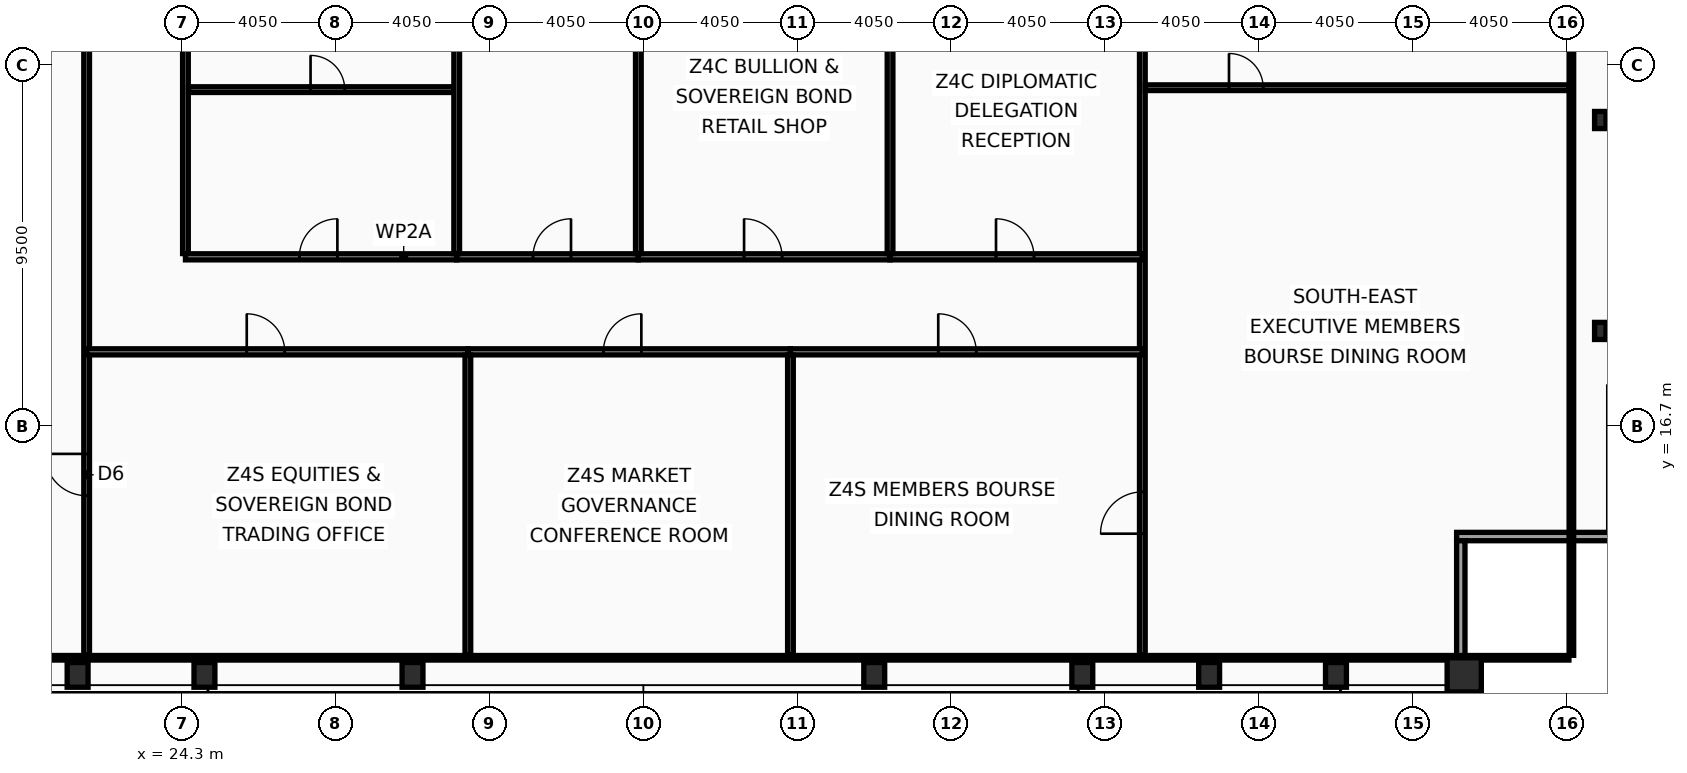
"""IFC4 building model, lengths in metres.
Left out: names, types, materials, properties, quantities, classifications, styles, units other than length and angle.
Written with IfcOpenShell. Run it as: python <this file> out.ifc"""

import sys

from ifc_helpers import new_model, si_unit, direction, frame, frame_2d, origin, origin_2d, place, context, subcontext, project, spatial, rectangle, hollow_rectangle, i_section, extrude, element, fill, save


model = new_model("IFC4")
c1 = context("Model", 3, precision=1e-05, world=origin(), true_north=direction((0.0, 1.0)))
c2 = subcontext(c1, "Body", "Model", "MODEL_VIEW")
j1 = project(units=[si_unit("LENGTHUNIT", "METRE"), si_unit("PLANEANGLEUNIT", "RADIAN")], contexts=[c1])
p1 = place(None, origin())
s1 = spatial("IfcSite", under=j1, at=p1, CompositionType="ELEMENT")
p2 = place(p1, origin())
s2 = spatial("IfcBuilding", under=s1, at=p2, CompositionType="ELEMENT")
p3 = place(p2, frame((0.0, 0.0, 298.6)))
s3 = spatial("IfcBuildingStorey", under=s2, at=p3, CompositionType="ELEMENT", Elevation=298.6)
p4 = place(p3, frame((58.05, 10.15, 0.0), z_axis=(0.0, 0.0, 1.0), x_axis=(1.0, 0.0, 0.0)))
e1 = element("IfcColumn", 1, at=p4, inside=s3, PredefinedType="COLUMN", context=c2, shape_type="SweptSolid", body=[
    extrude(hollow_rectangle(XDim=0.9, YDim=0.9, WallThickness=0.05, at=origin_2d()), origin(), (0.0, 0.0, 1.0), 3.6),
])
for number, where, z_axis, x_axis in (
    (2, (21.562, 10.15, 0.0), (0.0, 0.0, 1.0), (1.0, 0.0, 0.0)),
    (3, (24.9, 10.15, 0.0), (0.0, 0.0, 1.0), (1.0, 0.0, 0.0)),
    (4, (30.375, 10.15, 0.0), (0.0, 0.0, 1.0), (1.0, 0.0, 0.0)),
    (5, (42.525, 10.15, 0.0), (0.0, 0.0, 1.0), (1.0, 0.0, 0.0)),
    (6, (48.0, 10.15, 0.0), (0.0, 0.0, 1.0), (1.0, 0.0, 0.0)),
    (7, (51.337, 10.15, 0.0), (0.0, 0.0, 1.0), (1.0, 0.0, 0.0)),
    (8, (54.675, 10.15, 0.0), (0.0, 0.0, 1.0), (1.0, 0.0, 0.0)),
):
    element("IfcColumn", number, at=place(p3, frame(where, z_axis=z_axis, x_axis=x_axis)), inside=s3, PredefinedType="COLUMN", context=c2, shape_type="SweptSolid", body=[
        extrude(hollow_rectangle(XDim=0.55, YDim=0.65, WallThickness=0.04, at=origin_2d()), origin(), (0.0, 0.0, 1.0), 3.6),
    ])
for number, where, z_axis, x_axis in (
    (9, (61.63, 19.2, 0.0), (0.0, 0.0, 1.0), (1.0, 0.0, 0.0)),
    (10, (61.63, 24.75, 0.0), (0.0, 0.0, 1.0), (1.0, 0.0, 0.0)),
):
    element("IfcColumn", number, at=place(p3, frame(where, z_axis=z_axis, x_axis=x_axis)), inside=s3, PredefinedType="COLUMN", context=c2, shape_type="SweptSolid", body=[
        extrude(i_section(OverallWidth=0.3, OverallDepth=0.45, WebThickness=0.014, FlangeThickness=0.026, at=origin_2d()), origin(), (0.0, 0.0, 1.0), 3.6),
    ])
p5 = place(p3, frame((62.07, 13.79, 0.0), z_axis=(0.0, 0.0, 1.0), x_axis=(-1.0, 0.0, 0.0)))
e11 = element("IfcWall", 11, at=p5, inside=s3, PredefinedType="SOLIDWALL", context=c2, shape_type="SweptSolid", body=[
    extrude(rectangle(XDim=4.22, YDim=0.22, at=frame_2d((2.11, 0.0))), origin(), (0.0, 0.0, 1.0), 2.88),
])
p6 = place(p3, frame((57.96, 13.68, 0.0), z_axis=(0.0, 0.0, 1.0), x_axis=(0.0, -1.0, 0.0)))
e12 = element("IfcWall", 12, at=p6, inside=s3, PredefinedType="SOLIDWALL", context=c2, shape_type="SweptSolid", body=[
    extrude(rectangle(XDim=3.91, YDim=0.22, at=frame_2d((1.955, 0.0))), origin(), (0.0, 0.0, 1.0), 2.88),
])
p7 = place(p3, frame((21.8, 10.665, 0.0), z_axis=(0.0, 0.0, 1.0), x_axis=(0.0, 1.0, 0.0)))
e13 = element("IfcWall", 13, at=p7, inside=s3, PredefinedType="PARTITIONING", context=c2, shape_type="SweptSolid", body=[
    extrude(rectangle(XDim=24.955, YDim=0.15, at=frame_2d((12.478, 0.0))), origin(), (0.0, 0.0, 1.0), 3.03),
])
p8 = place(p7, frame((4.2, 0.0, 0.0)))
e14 = element("IfcOpeningElement", 14, at=p8, cuts=e13, PredefinedType="OPENING", context=c2, shape_type="SweptSolid", body=[
    extrude(rectangle(XDim=1.1, YDim=2.1, at=frame_2d((0.55, 1.05))), frame((0.0, 0.085, 0.0), z_axis=(0.0, -1.0, 0.0), x_axis=(1.0, 0.0, 0.0)), (0.0, 0.0, 1.0), 0.17),
])
p9 = place(p3, frame((24.4, 21.235, 0.0), z_axis=(0.0, 0.0, 1.0), x_axis=(0.0, 1.0, 0.0)))
e15 = element("IfcWall", 15, at=p9, inside=s3, PredefinedType="PARTITIONING", context=c2, shape_type="SweptSolid", body=[
    extrude(rectangle(XDim=14.385, YDim=0.15, at=frame_2d((7.192, 0.0))), origin(), (0.0, 0.0, 1.0), 2.78),
])
p10 = place(p3, frame((49.58, 10.665, 0.0), z_axis=(0.0, 0.0, 1.0), x_axis=(0.0, 1.0, 0.0)))
e16 = element("IfcWall", 16, at=p10, inside=s3, PredefinedType="PARTITIONING", context=c2, shape_type="SweptSolid", body=[
    extrude(rectangle(XDim=24.955, YDim=0.15, at=frame_2d((12.478, 0.0))), origin(), (0.0, 0.0, 1.0), 3.03),
])
p11 = place(p10, frame((3.2, 0.0, 0.0)))
e17 = element("IfcOpeningElement", 17, at=p11, cuts=e16, PredefinedType="OPENING", context=c2, shape_type="SweptSolid", body=[
    extrude(rectangle(XDim=1.1, YDim=2.1, at=frame_2d((0.55, 1.05))), frame((0.0, 0.085, 0.0), z_axis=(0.0, -1.0, 0.0), x_axis=(1.0, 0.0, 0.0)), (0.0, 0.0, 1.0), 0.17),
])
p12 = place(p3, frame((49.66, 25.6, 0.0), z_axis=(0.0, 0.0, 1.0), x_axis=(1.0, 0.0, 0.0)))
e18 = element("IfcWall", 18, at=p12, inside=s3, PredefinedType="PARTITIONING", context=c2, shape_type="SweptSolid", body=[
    extrude(rectangle(XDim=11.145, YDim=0.15, at=frame_2d((5.573, 0.0))), origin(), (0.0, 0.0, 1.0), 2.78),
])
p13 = place(p12, frame((2.2, 0.0, 0.0)))
e19 = element("IfcOpeningElement", 19, at=p13, cuts=e18, PredefinedType="OPENING", context=c2, shape_type="SweptSolid", body=[
    extrude(rectangle(XDim=0.9, YDim=2.05, at=frame_2d((0.45, 1.025))), frame((0.0, 0.085, 0.0), z_axis=(0.0, -1.0, 0.0), x_axis=(1.0, 0.0, 0.0)), (0.0, 0.0, 1.0), 0.17),
])
p14 = place(p3, frame((24.4, 21.15, 0.0), z_axis=(0.0, 0.0, 1.0), x_axis=(1.0, 0.0, 0.0)))
e20 = element("IfcWall", 20, at=p14, inside=s3, PredefinedType="PARTITIONING", context=c2, shape_type="SweptSolid", body=[
    extrude(rectangle(XDim=7.138, YDim=0.16, at=frame_2d((3.569, 0.0))), origin(), (0.0, 0.0, 1.0), 2.78),
])
p15 = place(p14, frame((2.998, 0.0, 0.0)))
e21 = element("IfcOpeningElement", 21, at=p15, cuts=e20, PredefinedType="OPENING", context=c2, shape_type="SweptSolid", body=[
    extrude(rectangle(XDim=1.0, YDim=2.05, at=frame_2d((0.5, 1.025))), frame((0.0, 0.09, 0.0), z_axis=(0.0, -1.0, 0.0), x_axis=(1.0, 0.0, 0.0)), (0.0, 0.0, 1.0), 0.18),
])
p16 = place(p3, frame((24.48, 25.55, 0.0), z_axis=(0.0, 0.0, 1.0), x_axis=(1.0, 0.0, 0.0)))
e22 = element("IfcWall", 22, at=p16, inside=s3, PredefinedType="PARTITIONING", context=c2, shape_type="SweptSolid", body=[
    extrude(rectangle(XDim=6.978, YDim=0.15, at=frame_2d((3.489, 0.0))), origin(), (0.0, 0.0, 1.0), 2.78),
])
p17 = place(p16, frame((3.212, 0.0, 0.0)))
e23 = element("IfcOpeningElement", 23, at=p17, cuts=e22, PredefinedType="OPENING", context=c2, shape_type="SweptSolid", body=[
    extrude(rectangle(XDim=0.9, YDim=2.05, at=frame_2d((0.45, 1.025))), frame((0.0, 0.085, 0.0), z_axis=(0.0, -1.0, 0.0), x_axis=(1.0, 0.0, 0.0)), (0.0, 0.0, 1.0), 0.17),
])
p18 = place(p3, frame((31.538, 21.15, 0.0), z_axis=(0.0, 0.0, 1.0), x_axis=(1.0, 0.0, 0.0)))
e24 = element("IfcWall", 24, at=p18, inside=s3, PredefinedType="PARTITIONING", context=c2, shape_type="SweptSolid", body=[
    extrude(rectangle(XDim=4.78, YDim=0.16, at=frame_2d((2.39, 0.0))), origin(), (0.0, 0.0, 1.0), 3.44),
])
p19 = place(p18, frame((2.008, 0.0, 0.0)))
e25 = element("IfcOpeningElement", 25, at=p19, cuts=e24, PredefinedType="OPENING", context=c2, shape_type="SweptSolid", body=[
    extrude(rectangle(XDim=1.0, YDim=2.05, at=frame_2d((0.5, 1.025))), frame((0.0, 0.09, 0.0), z_axis=(0.0, -1.0, 0.0), x_axis=(1.0, 0.0, 0.0)), (0.0, 0.0, 1.0), 0.18),
])
p20 = place(p3, frame((31.538, 21.235, 0.0), z_axis=(0.0, 0.0, 1.0), x_axis=(0.0, 1.0, 0.0)))
e26 = element("IfcWall", 26, at=p20, inside=s3, PredefinedType="PARTITIONING", context=c2, shape_type="SweptSolid", body=[
    extrude(rectangle(XDim=14.385, YDim=0.15, at=frame_2d((7.192, 0.0))), origin(), (0.0, 0.0, 1.0), 3.03),
])
p21 = place(p3, frame((36.318, 21.15, 0.0), z_axis=(0.0, 0.0, 1.0), x_axis=(1.0, 0.0, 0.0)))
e27 = element("IfcWall", 27, at=p21, inside=s3, PredefinedType="PARTITIONING", context=c2, shape_type="SweptSolid", body=[
    extrude(rectangle(XDim=6.623, YDim=0.16, at=frame_2d((3.312, 0.0))), origin(), (0.0, 0.0, 1.0), 2.78),
])
p22 = place(p21, frame((2.782, 0.0, 0.0)))
e28 = element("IfcOpeningElement", 28, at=p22, cuts=e27, PredefinedType="OPENING", context=c2, shape_type="SweptSolid", body=[
    extrude(rectangle(XDim=1.0, YDim=2.05, at=frame_2d((0.5, 1.025))), frame((0.0, 0.09, 0.0), z_axis=(0.0, -1.0, 0.0), x_axis=(1.0, 0.0, 0.0)), (0.0, 0.0, 1.0), 0.18),
])
p23 = place(p3, frame((36.318, 21.235, 0.0), z_axis=(0.0, 0.0, 1.0), x_axis=(0.0, 1.0, 0.0)))
e29 = element("IfcWall", 29, at=p23, inside=s3, PredefinedType="PARTITIONING", context=c2, shape_type="SweptSolid", body=[
    extrude(rectangle(XDim=14.385, YDim=0.15, at=frame_2d((7.192, 0.0))), origin(), (0.0, 0.0, 1.0), 3.03),
])
p24 = place(p3, frame((42.941, 21.15, 0.0), z_axis=(0.0, 0.0, 1.0), x_axis=(1.0, 0.0, 0.0)))
e30 = element("IfcWall", 30, at=p24, inside=s3, PredefinedType="PARTITIONING", context=c2, shape_type="SweptSolid", body=[
    extrude(rectangle(XDim=6.639, YDim=0.16, at=frame_2d((3.319, 0.0))), origin(), (0.0, 0.0, 1.0), 2.78),
])
p25 = place(p24, frame((2.788, 0.0, 0.0)))
e31 = element("IfcOpeningElement", 31, at=p25, cuts=e30, PredefinedType="OPENING", context=c2, shape_type="SweptSolid", body=[
    extrude(rectangle(XDim=1.0, YDim=2.05, at=frame_2d((0.5, 1.025))), frame((0.0, 0.09, 0.0), z_axis=(0.0, -1.0, 0.0), x_axis=(1.0, 0.0, 0.0)), (0.0, 0.0, 1.0), 0.18),
])
p26 = place(p3, frame((42.941, 21.235, 0.0), z_axis=(0.0, 0.0, 1.0), x_axis=(0.0, 1.0, 0.0)))
e32 = element("IfcWall", 32, at=p26, inside=s3, PredefinedType="PARTITIONING", context=c2, shape_type="SweptSolid", body=[
    extrude(rectangle(XDim=14.385, YDim=0.15, at=frame_2d((7.192, 0.0))), origin(), (0.0, 0.0, 1.0), 2.78),
])
p27 = place(p3, frame((21.8, 18.65, 0.0), z_axis=(0.0, 0.0, 1.0), x_axis=(1.0, 0.0, 0.0)))
e33 = element("IfcWall", 33, at=p27, inside=s3, PredefinedType="PARTITIONING", context=c2, shape_type="SweptSolid", body=[
    extrude(rectangle(XDim=10.032, YDim=0.16, at=frame_2d((5.016, 0.0))), origin(), (0.0, 0.0, 1.0), 2.78),
])
p28 = place(p27, frame((4.213, 0.0, 0.0)))
e34 = element("IfcOpeningElement", 34, at=p28, cuts=e33, PredefinedType="OPENING", context=c2, shape_type="SweptSolid", body=[
    extrude(rectangle(XDim=1.0, YDim=2.05, at=frame_2d((0.5, 1.025))), frame((0.0, 0.09, 0.0), z_axis=(0.0, -1.0, 0.0), x_axis=(1.0, 0.0, 0.0)), (0.0, 0.0, 1.0), 0.18),
])
p29 = place(p3, frame((31.832, 18.65, 0.0), z_axis=(0.0, 0.0, 1.0), x_axis=(1.0, 0.0, 0.0)))
e35 = element("IfcWall", 35, at=p29, inside=s3, PredefinedType="PARTITIONING", context=c2, shape_type="SweptSolid", body=[
    extrude(rectangle(XDim=8.488, YDim=0.16, at=frame_2d((4.244, 0.0))), origin(), (0.0, 0.0, 1.0), 3.44),
])
p30 = place(p29, frame((3.565, 0.0, 0.0)))
e36 = element("IfcOpeningElement", 36, at=p30, cuts=e35, PredefinedType="OPENING", context=c2, shape_type="SweptSolid", body=[
    extrude(rectangle(XDim=1.0, YDim=2.05, at=frame_2d((0.5, 1.025))), frame((0.0, 0.09, 0.0), z_axis=(0.0, -1.0, 0.0), x_axis=(1.0, 0.0, 0.0)), (0.0, 0.0, 1.0), 0.18),
])
p31 = place(p3, frame((31.832, 10.665, 0.0), z_axis=(0.0, 0.0, 1.0), x_axis=(0.0, 1.0, 0.0)))
e37 = element("IfcWall", 37, at=p31, inside=s3, PredefinedType="PARTITIONING", context=c2, shape_type="SweptSolid", body=[
    extrude(rectangle(XDim=7.9, YDim=0.15, at=frame_2d((3.95, 0.0))), origin(), (0.0, 0.0, 1.0), 3.03),
])
p32 = place(p3, frame((40.32, 18.65, 0.0), z_axis=(0.0, 0.0, 1.0), x_axis=(1.0, 0.0, 0.0)))
e38 = element("IfcWall", 38, at=p32, inside=s3, PredefinedType="PARTITIONING", context=c2, shape_type="SweptSolid", body=[
    extrude(rectangle(XDim=9.26, YDim=0.16, at=frame_2d((4.63, 0.0))), origin(), (0.0, 0.0, 1.0), 2.78),
])
p33 = place(p32, frame((3.889, 0.0, 0.0)))
e39 = element("IfcOpeningElement", 39, at=p33, cuts=e38, PredefinedType="OPENING", context=c2, shape_type="SweptSolid", body=[
    extrude(rectangle(XDim=1.0, YDim=2.05, at=frame_2d((0.5, 1.025))), frame((0.0, 0.09, 0.0), z_axis=(0.0, -1.0, 0.0), x_axis=(1.0, 0.0, 0.0)), (0.0, 0.0, 1.0), 0.18),
])
p34 = place(p3, frame((40.32, 10.665, 0.0), z_axis=(0.0, 0.0, 1.0), x_axis=(0.0, 1.0, 0.0)))
e40 = element("IfcWall", 40, at=p34, inside=s3, PredefinedType="PARTITIONING", context=c2, shape_type="SweptSolid", body=[
    extrude(rectangle(XDim=7.9, YDim=0.15, at=frame_2d((3.95, 0.0))), origin(), (0.0, 0.0, 1.0), 3.03),
])
p35 = place(p3, frame((60.87, 10.665, 0.0), z_axis=(0.0, 0.0, 1.0), x_axis=(0.0, 1.0, 0.0)))
e41 = element("IfcWall", 41, at=p35, inside=s3, PredefinedType="PARTITIONING", context=c2, shape_type="SweptSolid", body=[
    extrude(rectangle(XDim=42.11, YDim=0.12, at=frame_2d((21.055, 0.0))), origin(), (0.0, 0.0, 1.0), 2.78),
])
p36 = place(p3, frame((12.095, 10.6, 0.0), z_axis=(0.0, 0.0, 1.0), x_axis=(1.0, 0.0, 0.0)))
e42 = element("IfcWall", 42, at=p36, inside=s3, PredefinedType="PARTITIONING", context=c2, shape_type="SweptSolid", body=[
    extrude(rectangle(XDim=48.71, YDim=0.12, at=frame_2d((24.355, 0.0))), origin(), (0.0, 0.0, 1.0), 2.78),
])
p37 = place(p8, origin())
e43 = element("IfcDoor", 43, at=p37, inside=s3, OperationType="SINGLE_SWING_RIGHT", PredefinedType="DOOR", context=c2, shape_type="SweptSolid", body=[
    extrude(rectangle(XDim=1.1, YDim=2.1, at=frame_2d((0.55, 1.05))), frame((0.0, 0.025, 0.0), z_axis=(0.0, -1.0, 0.0), x_axis=(1.0, 0.0, 0.0)), (0.0, 0.0, 1.0), 0.05),
])
fill(e14, e43)
p38 = place(p11, origin())
e44 = element("IfcDoor", 44, at=p38, inside=s3, OperationType="SINGLE_SWING_LEFT", PredefinedType="DOOR", context=c2, shape_type="SweptSolid", body=[
    extrude(rectangle(XDim=1.1, YDim=2.1, at=frame_2d((0.55, 1.05))), frame((0.0, 0.025, 0.0), z_axis=(0.0, -1.0, 0.0), x_axis=(1.0, 0.0, 0.0)), (0.0, 0.0, 1.0), 0.05),
])
fill(e17, e44)
p39 = place(p13, origin())
e45 = element("IfcDoor", 45, at=p39, inside=s3, OperationType="SINGLE_SWING_LEFT", PredefinedType="DOOR", context=c2, shape_type="SweptSolid", body=[
    extrude(rectangle(XDim=0.9, YDim=2.05, at=frame_2d((0.45, 1.025))), frame((0.0, 0.025, 0.0), z_axis=(0.0, -1.0, 0.0), x_axis=(1.0, 0.0, 0.0)), (0.0, 0.0, 1.0), 0.05),
])
fill(e19, e45)
p40 = place(p15, origin())
e46 = element("IfcDoor", 46, at=p40, inside=s3, OperationType="SINGLE_SWING_RIGHT", PredefinedType="DOOR", context=c2, shape_type="SweptSolid", body=[
    extrude(rectangle(XDim=1.0, YDim=2.05, at=frame_2d((0.5, 1.025))), frame((0.0, 0.025, 0.0), z_axis=(0.0, -1.0, 0.0), x_axis=(1.0, 0.0, 0.0)), (0.0, 0.0, 1.0), 0.05),
])
fill(e21, e46)
p41 = place(p17, origin())
e47 = element("IfcDoor", 47, at=p41, inside=s3, OperationType="SINGLE_SWING_LEFT", PredefinedType="DOOR", context=c2, shape_type="SweptSolid", body=[
    extrude(rectangle(XDim=0.9, YDim=2.05, at=frame_2d((0.45, 1.025))), frame((0.0, 0.025, 0.0), z_axis=(0.0, -1.0, 0.0), x_axis=(1.0, 0.0, 0.0)), (0.0, 0.0, 1.0), 0.05),
])
fill(e23, e47)
p42 = place(p19, origin())
e48 = element("IfcDoor", 48, at=p42, inside=s3, OperationType="SINGLE_SWING_RIGHT", PredefinedType="DOOR", context=c2, shape_type="SweptSolid", body=[
    extrude(rectangle(XDim=1.0, YDim=2.05, at=frame_2d((0.5, 1.025))), frame((0.0, 0.025, 0.0), z_axis=(0.0, -1.0, 0.0), x_axis=(1.0, 0.0, 0.0)), (0.0, 0.0, 1.0), 0.05),
])
fill(e25, e48)
p43 = place(p22, origin())
e49 = element("IfcDoor", 49, at=p43, inside=s3, OperationType="SINGLE_SWING_LEFT", PredefinedType="DOOR", context=c2, shape_type="SweptSolid", body=[
    extrude(rectangle(XDim=1.0, YDim=2.05, at=frame_2d((0.5, 1.025))), frame((0.0, 0.025, 0.0), z_axis=(0.0, -1.0, 0.0), x_axis=(1.0, 0.0, 0.0)), (0.0, 0.0, 1.0), 0.05),
])
fill(e28, e49)
p44 = place(p25, origin())
e50 = element("IfcDoor", 50, at=p44, inside=s3, OperationType="SINGLE_SWING_LEFT", PredefinedType="DOOR", context=c2, shape_type="SweptSolid", body=[
    extrude(rectangle(XDim=1.0, YDim=2.05, at=frame_2d((0.5, 1.025))), frame((0.0, 0.025, 0.0), z_axis=(0.0, -1.0, 0.0), x_axis=(1.0, 0.0, 0.0)), (0.0, 0.0, 1.0), 0.05),
])
fill(e31, e50)
p45 = place(p28, origin())
e51 = element("IfcDoor", 51, at=p45, inside=s3, OperationType="SINGLE_SWING_LEFT", PredefinedType="DOOR", context=c2, shape_type="SweptSolid", body=[
    extrude(rectangle(XDim=1.0, YDim=2.05, at=frame_2d((0.5, 1.025))), frame((0.0, 0.025, 0.0), z_axis=(0.0, -1.0, 0.0), x_axis=(1.0, 0.0, 0.0)), (0.0, 0.0, 1.0), 0.05),
])
fill(e34, e51)
p46 = place(p30, origin())
e52 = element("IfcDoor", 52, at=p46, inside=s3, OperationType="SINGLE_SWING_RIGHT", PredefinedType="DOOR", context=c2, shape_type="SweptSolid", body=[
    extrude(rectangle(XDim=1.0, YDim=2.05, at=frame_2d((0.5, 1.025))), frame((0.0, 0.025, 0.0), z_axis=(0.0, -1.0, 0.0), x_axis=(1.0, 0.0, 0.0)), (0.0, 0.0, 1.0), 0.05),
])
fill(e36, e52)
p47 = place(p33, origin())
e53 = element("IfcDoor", 53, at=p47, inside=s3, OperationType="SINGLE_SWING_LEFT", PredefinedType="DOOR", context=c2, shape_type="SweptSolid", body=[
    extrude(rectangle(XDim=1.0, YDim=2.05, at=frame_2d((0.5, 1.025))), frame((0.0, 0.025, 0.0), z_axis=(0.0, -1.0, 0.0), x_axis=(1.0, 0.0, 0.0)), (0.0, 0.0, 1.0), 0.05),
])
fill(e39, e53)
save(model, sys.argv[1])
